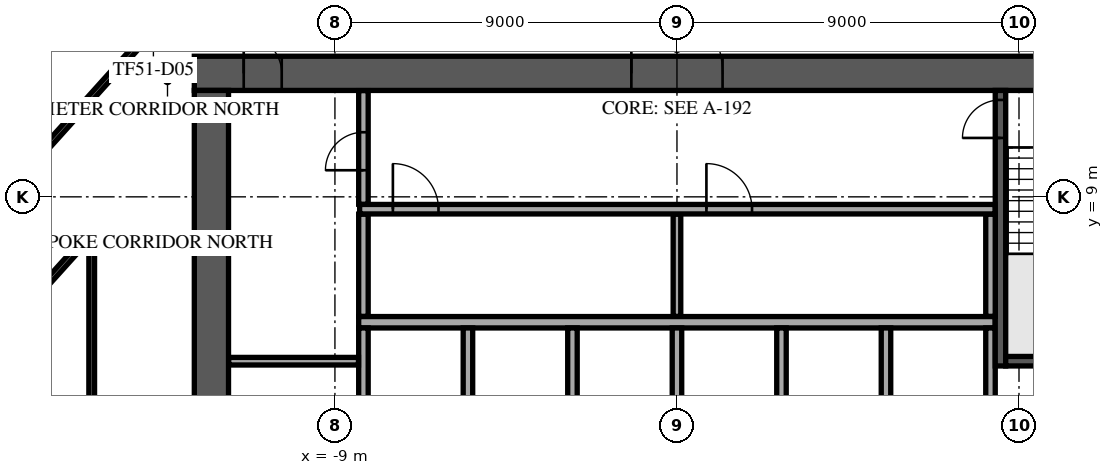
"""IFC4 building model, lengths in metres.
Left out: names, types, materials, properties, quantities, classifications, styles, units other than length and angle.
Written with IfcOpenShell. Run it as: python <this file> out.ifc"""

import sys

from ifc_helpers import new_model, si_unit, direction, frame, frame_2d, origin, place, context, subcontext, project, spatial, rectangle, extrude, element, fill, save


model = new_model("IFC4")
c1 = context("Model", 3, precision=1e-05, world=origin(), true_north=direction((0.0, 1.0)))
c2 = subcontext(c1, "Body", "Model", "MODEL_VIEW")
j1 = project(units=[si_unit("LENGTHUNIT", "METRE"), si_unit("PLANEANGLEUNIT", "RADIAN")], contexts=[c1])
p1 = place(None, origin())
s1 = spatial("IfcSite", under=j1, at=p1, CompositionType="ELEMENT")
p2 = place(p1, origin())
s2 = spatial("IfcBuilding", under=s1, at=p2, CompositionType="ELEMENT")
p3 = place(p2, frame((0.0, 0.0, 217.3)))
s3 = spatial("IfcBuildingStorey", under=s2, at=p3, CompositionType="ELEMENT", Elevation=217.3)
p4 = place(p3, frame((-12.7, 12.25, 0.0), z_axis=(0.0, 0.0, 1.0), x_axis=(1.0, 0.0, 0.0)))
e1 = element("IfcWall", 1, at=p4, inside=s3, PredefinedType="SHEAR", context=c2, shape_type="SweptSolid", body=[
    extrude(rectangle(XDim=25.4, YDim=0.9, at=frame_2d((12.7, 0.0))), origin(), (0.0, 0.0, 1.0), 3.62),
])
p5 = place(p4, frame((11.5, 0.0, 0.0)))
e2 = element("IfcOpeningElement", 2, at=p5, cuts=e1, PredefinedType="OPENING", context=c2, shape_type="SweptSolid", body=[
    extrude(rectangle(XDim=2.4, YDim=2.4, at=frame_2d((1.2, 1.2))), frame((0.0, 0.46, 0.0), z_axis=(0.0, -1.0, 0.0), x_axis=(1.0, 0.0, 0.0)), (0.0, 0.0, 1.0), 0.92),
])
p6 = place(p4, frame((22.325, 0.0, 0.0)))
e3 = element("IfcOpeningElement", 3, at=p6, cuts=e1, PredefinedType="OPENING", context=c2, shape_type="SweptSolid", body=[
    extrude(rectangle(XDim=1.2, YDim=2.1, at=frame_2d((0.6, 1.05))), frame((0.0, 0.46, 0.0), z_axis=(0.0, -1.0, 0.0), x_axis=(1.0, 0.0, 0.0)), (0.0, 0.0, 1.0), 0.92),
])
p7 = place(p4, frame((1.3, 0.0, 0.0)))
e4 = element("IfcOpeningElement", 4, at=p7, cuts=e1, PredefinedType="OPENING", context=c2, shape_type="SweptSolid", body=[
    extrude(rectangle(XDim=1.0, YDim=2.1, at=frame_2d((0.5, 1.05))), frame((0.0, 0.46, 0.0), z_axis=(0.0, -1.0, 0.0), x_axis=(1.0, 0.0, 0.0)), (0.0, 0.0, 1.0), 0.92),
])
p8 = place(p3, frame((-12.25, -11.8, 0.0), z_axis=(0.0, 0.0, 1.0), x_axis=(0.0, 1.0, 0.0)))
e5 = element("IfcWall", 5, at=p8, inside=s3, PredefinedType="SHEAR", context=c2, shape_type="SweptSolid", body=[
    extrude(rectangle(XDim=23.6, YDim=0.9, at=frame_2d((11.8, 0.0))), origin(), (0.0, 0.0, 1.0), 3.62),
])
p9 = place(p8, frame((10.6, 0.0, 0.0)))
e6 = element("IfcOpeningElement", 6, at=p9, cuts=e5, PredefinedType="OPENING", context=c2, shape_type="SweptSolid", body=[
    extrude(rectangle(XDim=2.4, YDim=2.4, at=frame_2d((1.2, 1.2))), frame((0.0, 0.46, 0.0), z_axis=(0.0, -1.0, 0.0), x_axis=(1.0, 0.0, 0.0)), (0.0, 0.0, 1.0), 0.92),
])
p10 = place(p3, frame((-8.375, 5.7, 0.0), z_axis=(0.0, 0.0, 1.0), x_axis=(1.0, 0.0, 0.0)))
e7 = element("IfcWall", 7, at=p10, inside=s3, PredefinedType="SOLIDWALL", context=c2, shape_type="SweptSolid", body=[
    extrude(rectangle(XDim=16.75, YDim=0.3, at=frame_2d((8.375, 0.0))), origin(), (0.0, 0.0, 1.0), 3.62),
])
for number, where, z_axis, x_axis in (
    (8, (-8.25, 2.85, 0.0), (0.0, 0.0, 1.0), (0.0, 1.0, 0.0)),
    (9, (-5.5, 2.85, 0.0), (0.0, 0.0, 1.0), (0.0, 1.0, 0.0)),
    (10, (-2.75, 2.85, 0.0), (0.0, 0.0, 1.0), (0.0, 1.0, 0.0)),
    (11, (0.0, 2.85, 0.0), (0.0, 0.0, 1.0), (0.0, 1.0, 0.0)),
    (12, (2.75, 2.85, 0.0), (0.0, 0.0, 1.0), (0.0, 1.0, 0.0)),
    (13, (5.5, 2.85, 0.0), (0.0, 0.0, 1.0), (0.0, 1.0, 0.0)),
    (14, (8.25, 2.85, 0.0), (0.0, 0.0, 1.0), (0.0, 1.0, 0.0)),
):
    element("IfcWall", number, at=place(p3, frame(where, z_axis=z_axis, x_axis=x_axis)), inside=s3, PredefinedType="SOLIDWALL", context=c2, shape_type="SweptSolid", body=[
        extrude(rectangle(XDim=2.7, YDim=0.25, at=frame_2d((1.35, 0.0))), origin(), (0.0, 0.0, 1.0), 3.62),
    ])
p11 = place(p3, frame((8.512, 4.55, 0.0), z_axis=(0.0, 0.0, 1.0), x_axis=(0.0, 1.0, 0.0)))
e15 = element("IfcWall", 15, at=p11, inside=s3, PredefinedType="SOLIDWALL", context=c2, shape_type="SweptSolid", body=[
    extrude(rectangle(XDim=7.25, YDim=0.275, at=frame_2d((3.625, 0.0))), origin(), (0.0, 0.0, 1.0), 3.62),
])
p12 = place(p11, frame((6.0, 0.0, 0.0)))
e16 = element("IfcOpeningElement", 16, at=p12, cuts=e15, PredefinedType="OPENING", context=c2, shape_type="SweptSolid", body=[
    extrude(rectangle(XDim=1.0, YDim=2.1, at=frame_2d((0.5, 1.05))), frame((0.0, 0.147, 0.0), z_axis=(0.0, -1.0, 0.0), x_axis=(1.0, 0.0, 0.0)), (0.0, 0.0, 1.0), 0.295),
])
p13 = place(p3, frame((8.65, 4.675, 0.0), z_axis=(0.0, 0.0, 1.0), x_axis=(1.0, 0.0, 0.0)))
e17 = element("IfcWall", 17, at=p13, inside=s3, PredefinedType="SOLIDWALL", context=c2, shape_type="SweptSolid", body=[
    extrude(rectangle(XDim=3.15, YDim=0.25, at=frame_2d((1.575, 0.0))), origin(), (0.0, 0.0, 1.0), 3.62),
])
p14 = place(p3, frame((-11.795, 4.675, 0.0), z_axis=(0.0, 0.0, 1.0), x_axis=(1.0, 0.0, 0.0)))
e18 = element("IfcWall", 18, at=p14, inside=s3, PredefinedType="PARTITIONING", context=c2, shape_type="SweptSolid", body=[
    extrude(rectangle(XDim=3.415, YDim=0.2, at=frame_2d((1.708, 0.0))), origin(), (0.0, 0.0, 1.0), 3.62),
])
p15 = place(p3, frame((-8.25, 5.855, 0.0), z_axis=(0.0, 0.0, 1.0), x_axis=(0.0, 1.0, 0.0)))
e19 = element("IfcWall", 19, at=p15, inside=s3, PredefinedType="PARTITIONING", context=c2, shape_type="SweptSolid", body=[
    extrude(rectangle(XDim=2.69, YDim=0.25, at=frame_2d((1.345, 0.0))), origin(), (0.0, 0.0, 1.0), 3.62),
])
p16 = place(p3, frame((0.0, 5.855, 0.0), z_axis=(0.0, 0.0, 1.0), x_axis=(0.0, 1.0, 0.0)))
e20 = element("IfcWall", 20, at=p16, inside=s3, PredefinedType="PARTITIONING", context=c2, shape_type="SweptSolid", body=[
    extrude(rectangle(XDim=2.69, YDim=0.2, at=frame_2d((1.345, 0.0))), origin(), (0.0, 0.0, 1.0), 3.62),
])
p17 = place(p3, frame((8.25, 5.855, 0.0), z_axis=(0.0, 0.0, 1.0), x_axis=(0.0, 1.0, 0.0)))
e21 = element("IfcWall", 21, at=p17, inside=s3, PredefinedType="PARTITIONING", context=c2, shape_type="SweptSolid", body=[
    extrude(rectangle(XDim=2.69, YDim=0.25, at=frame_2d((1.345, 0.0))), origin(), (0.0, 0.0, 1.0), 3.62),
])
p18 = place(p3, frame((-8.35, 8.675, 0.0), z_axis=(0.0, 0.0, 1.0), x_axis=(1.0, 0.0, 0.0)))
e22 = element("IfcWall", 22, at=p18, inside=s3, PredefinedType="PARTITIONING", context=c2, shape_type="SweptSolid", body=[
    extrude(rectangle(XDim=16.72, YDim=0.25, at=frame_2d((8.36, 0.0))), origin(), (0.0, 0.0, 1.0), 3.62),
])
p19 = place(p18, frame((0.875, 0.0, 0.0)))
e23 = element("IfcOpeningElement", 23, at=p19, cuts=e22, PredefinedType="OPENING", context=c2, shape_type="SweptSolid", body=[
    extrude(rectangle(XDim=1.2, YDim=2.1, at=frame_2d((0.6, 1.05))), frame((0.0, 0.135, 0.0), z_axis=(0.0, -1.0, 0.0), x_axis=(1.0, 0.0, 0.0)), (0.0, 0.0, 1.0), 0.27),
])
p20 = place(p18, frame((9.125, 0.0, 0.0)))
e24 = element("IfcOpeningElement", 24, at=p20, cuts=e22, PredefinedType="OPENING", context=c2, shape_type="SweptSolid", body=[
    extrude(rectangle(XDim=1.2, YDim=2.1, at=frame_2d((0.6, 1.05))), frame((0.0, 0.135, 0.0), z_axis=(0.0, -1.0, 0.0), x_axis=(1.0, 0.0, 0.0)), (0.0, 0.0, 1.0), 0.27),
])
p21 = place(p3, frame((-8.25, 8.805, 0.0), z_axis=(0.0, 0.0, 1.0), x_axis=(0.0, 1.0, 0.0)))
e25 = element("IfcWall", 25, at=p21, inside=s3, PredefinedType="PARTITIONING", context=c2, shape_type="SweptSolid", body=[
    extrude(rectangle(XDim=2.99, YDim=0.25, at=frame_2d((1.495, 0.0))), origin(), (0.0, 0.0, 1.0), 3.62),
])
p22 = place(p21, frame((0.895, 0.0, 0.0)))
e26 = element("IfcOpeningElement", 26, at=p22, cuts=e25, PredefinedType="OPENING", context=c2, shape_type="SweptSolid", body=[
    extrude(rectangle(XDim=1.0, YDim=2.1, at=frame_2d((0.5, 1.05))), frame((0.0, 0.135, 0.0), z_axis=(0.0, -1.0, 0.0), x_axis=(1.0, 0.0, 0.0)), (0.0, 0.0, 1.0), 0.27),
])
p23 = place(p3, frame((-1.962, 34.735, 0.0), z_axis=(0.0, 0.0, 1.0), x_axis=(-0.669133181838, -0.743142506497, 0.0)))
e27 = element("IfcWall", 27, at=p23, inside=s3, PredefinedType="STANDARD", context=c2, shape_type="SweptSolid", body=[
    extrude(rectangle(XDim=49.0, YDim=0.6, at=frame_2d((24.5, 0.0))), origin(), (0.0, 0.0, 1.0), 3.62),
])
p24 = place(p23, frame((1.227, 0.0, 0.9)))
e28 = element("IfcOpeningElement", 28, at=p24, cuts=e27, PredefinedType="OPENING", context=c2, shape_type="SweptSolid", body=[
    extrude(rectangle(XDim=2.0, YDim=2.1, at=frame_2d((1.0, 1.05))), frame((0.0, 0.31, 0.0), z_axis=(0.0, -1.0, 0.0), x_axis=(1.0, 0.0, 0.0)), (0.0, 0.0, 1.0), 0.62),
])
p25 = place(p23, frame((5.682, 0.0, 0.9)))
e29 = element("IfcOpeningElement", 29, at=p25, cuts=e27, PredefinedType="OPENING", context=c2, shape_type="SweptSolid", body=[
    extrude(rectangle(XDim=2.0, YDim=2.1, at=frame_2d((1.0, 1.05))), frame((0.0, 0.31, 0.0), z_axis=(0.0, -1.0, 0.0), x_axis=(1.0, 0.0, 0.0)), (0.0, 0.0, 1.0), 0.62),
])
p26 = place(p23, frame((10.136, 0.0, 0.9)))
e30 = element("IfcOpeningElement", 30, at=p26, cuts=e27, PredefinedType="OPENING", context=c2, shape_type="SweptSolid", body=[
    extrude(rectangle(XDim=2.0, YDim=2.1, at=frame_2d((1.0, 1.05))), frame((0.0, 0.31, 0.0), z_axis=(0.0, -1.0, 0.0), x_axis=(1.0, 0.0, 0.0)), (0.0, 0.0, 1.0), 0.62),
])
p27 = place(p23, frame((14.591, 0.0, 0.9)))
e31 = element("IfcOpeningElement", 31, at=p27, cuts=e27, PredefinedType="OPENING", context=c2, shape_type="SweptSolid", body=[
    extrude(rectangle(XDim=2.0, YDim=2.1, at=frame_2d((1.0, 1.05))), frame((0.0, 0.31, 0.0), z_axis=(0.0, -1.0, 0.0), x_axis=(1.0, 0.0, 0.0)), (0.0, 0.0, 1.0), 0.62),
])
p28 = place(p23, frame((19.045, 0.0, 0.9)))
e32 = element("IfcOpeningElement", 32, at=p28, cuts=e27, PredefinedType="OPENING", context=c2, shape_type="SweptSolid", body=[
    extrude(rectangle(XDim=2.0, YDim=2.1, at=frame_2d((1.0, 1.05))), frame((0.0, 0.31, 0.0), z_axis=(0.0, -1.0, 0.0), x_axis=(1.0, 0.0, 0.0)), (0.0, 0.0, 1.0), 0.62),
])
p29 = place(p23, frame((23.5, 0.0, 0.9)))
e33 = element("IfcOpeningElement", 33, at=p29, cuts=e27, PredefinedType="OPENING", context=c2, shape_type="SweptSolid", body=[
    extrude(rectangle(XDim=2.0, YDim=2.1, at=frame_2d((1.0, 1.05))), frame((0.0, 0.31, 0.0), z_axis=(0.0, -1.0, 0.0), x_axis=(1.0, 0.0, 0.0)), (0.0, 0.0, 1.0), 0.62),
])
p30 = place(p23, frame((27.955, 0.0, 0.9)))
e34 = element("IfcOpeningElement", 34, at=p30, cuts=e27, PredefinedType="OPENING", context=c2, shape_type="SweptSolid", body=[
    extrude(rectangle(XDim=2.0, YDim=2.1, at=frame_2d((1.0, 1.05))), frame((0.0, 0.31, 0.0), z_axis=(0.0, -1.0, 0.0), x_axis=(1.0, 0.0, 0.0)), (0.0, 0.0, 1.0), 0.62),
])
p31 = place(p23, frame((32.409, 0.0, 0.9)))
e35 = element("IfcOpeningElement", 35, at=p31, cuts=e27, PredefinedType="OPENING", context=c2, shape_type="SweptSolid", body=[
    extrude(rectangle(XDim=2.0, YDim=2.1, at=frame_2d((1.0, 1.05))), frame((0.0, 0.31, 0.0), z_axis=(0.0, -1.0, 0.0), x_axis=(1.0, 0.0, 0.0)), (0.0, 0.0, 1.0), 0.62),
])
p32 = place(p23, frame((36.864, 0.0, 0.9)))
e36 = element("IfcOpeningElement", 36, at=p32, cuts=e27, PredefinedType="OPENING", context=c2, shape_type="SweptSolid", body=[
    extrude(rectangle(XDim=2.0, YDim=2.1, at=frame_2d((1.0, 1.05))), frame((0.0, 0.31, 0.0), z_axis=(0.0, -1.0, 0.0), x_axis=(1.0, 0.0, 0.0)), (0.0, 0.0, 1.0), 0.62),
])
p33 = place(p23, frame((41.318, 0.0, 0.9)))
e37 = element("IfcOpeningElement", 37, at=p33, cuts=e27, PredefinedType="OPENING", context=c2, shape_type="SweptSolid", body=[
    extrude(rectangle(XDim=2.0, YDim=2.1, at=frame_2d((1.0, 1.05))), frame((0.0, 0.31, 0.0), z_axis=(0.0, -1.0, 0.0), x_axis=(1.0, 0.0, 0.0)), (0.0, 0.0, 1.0), 0.62),
])
p34 = place(p23, frame((45.773, 0.0, 0.9)))
e38 = element("IfcOpeningElement", 38, at=p34, cuts=e27, PredefinedType="OPENING", context=c2, shape_type="SweptSolid", body=[
    extrude(rectangle(XDim=2.0, YDim=2.1, at=frame_2d((1.0, 1.05))), frame((0.0, 0.31, 0.0), z_axis=(0.0, -1.0, 0.0), x_axis=(1.0, 0.0, 0.0)), (0.0, 0.0, 1.0), 0.62),
])
p35 = place(p3, frame((34.365, 9.023, 0.0), z_axis=(0.0, 0.0, 1.0), x_axis=(-0.743146896498, 0.66912830625, 0.0)))
e39 = element("IfcWall", 39, at=p35, inside=s3, PredefinedType="STANDARD", context=c2, shape_type="SweptSolid", body=[
    extrude(rectangle(XDim=39.0, YDim=0.6, at=frame_2d((19.5, 0.0))), origin(), (0.0, 0.0, 1.0), 3.62),
])
p36 = place(p35, frame((1.217, 0.0, 0.9)))
e40 = element("IfcOpeningElement", 40, at=p36, cuts=e39, PredefinedType="OPENING", context=c2, shape_type="SweptSolid", body=[
    extrude(rectangle(XDim=1.9, YDim=2.1, at=frame_2d((0.95, 1.05))), frame((0.0, 0.31, 0.0), z_axis=(0.0, -1.0, 0.0), x_axis=(1.0, 0.0, 0.0)), (0.0, 0.0, 1.0), 0.62),
])
p37 = place(p35, frame((5.55, 0.0, 0.9)))
e41 = element("IfcOpeningElement", 41, at=p37, cuts=e39, PredefinedType="OPENING", context=c2, shape_type="SweptSolid", body=[
    extrude(rectangle(XDim=1.9, YDim=2.1, at=frame_2d((0.95, 1.05))), frame((0.0, 0.31, 0.0), z_axis=(0.0, -1.0, 0.0), x_axis=(1.0, 0.0, 0.0)), (0.0, 0.0, 1.0), 0.62),
])
p38 = place(p35, frame((9.883, 0.0, 0.9)))
e42 = element("IfcOpeningElement", 42, at=p38, cuts=e39, PredefinedType="OPENING", context=c2, shape_type="SweptSolid", body=[
    extrude(rectangle(XDim=1.9, YDim=2.1, at=frame_2d((0.95, 1.05))), frame((0.0, 0.31, 0.0), z_axis=(0.0, -1.0, 0.0), x_axis=(1.0, 0.0, 0.0)), (0.0, 0.0, 1.0), 0.62),
])
p39 = place(p35, frame((14.217, 0.0, 0.9)))
e43 = element("IfcOpeningElement", 43, at=p39, cuts=e39, PredefinedType="OPENING", context=c2, shape_type="SweptSolid", body=[
    extrude(rectangle(XDim=1.9, YDim=2.1, at=frame_2d((0.95, 1.05))), frame((0.0, 0.31, 0.0), z_axis=(0.0, -1.0, 0.0), x_axis=(1.0, 0.0, 0.0)), (0.0, 0.0, 1.0), 0.62),
])
p40 = place(p35, frame((18.55, 0.0, 0.9)))
e44 = element("IfcOpeningElement", 44, at=p40, cuts=e39, PredefinedType="OPENING", context=c2, shape_type="SweptSolid", body=[
    extrude(rectangle(XDim=1.9, YDim=2.1, at=frame_2d((0.95, 1.05))), frame((0.0, 0.31, 0.0), z_axis=(0.0, -1.0, 0.0), x_axis=(1.0, 0.0, 0.0)), (0.0, 0.0, 1.0), 0.62),
])
p41 = place(p35, frame((22.883, 0.0, 0.9)))
e45 = element("IfcOpeningElement", 45, at=p41, cuts=e39, PredefinedType="OPENING", context=c2, shape_type="SweptSolid", body=[
    extrude(rectangle(XDim=1.9, YDim=2.1, at=frame_2d((0.95, 1.05))), frame((0.0, 0.31, 0.0), z_axis=(0.0, -1.0, 0.0), x_axis=(1.0, 0.0, 0.0)), (0.0, 0.0, 1.0), 0.62),
])
p42 = place(p35, frame((27.217, 0.0, 0.9)))
e46 = element("IfcOpeningElement", 46, at=p42, cuts=e39, PredefinedType="OPENING", context=c2, shape_type="SweptSolid", body=[
    extrude(rectangle(XDim=1.9, YDim=2.1, at=frame_2d((0.95, 1.05))), frame((0.0, 0.31, 0.0), z_axis=(0.0, -1.0, 0.0), x_axis=(1.0, 0.0, 0.0)), (0.0, 0.0, 1.0), 0.62),
])
p43 = place(p35, frame((31.55, 0.0, 0.9)))
e47 = element("IfcOpeningElement", 47, at=p43, cuts=e39, PredefinedType="OPENING", context=c2, shape_type="SweptSolid", body=[
    extrude(rectangle(XDim=1.9, YDim=2.1, at=frame_2d((0.95, 1.05))), frame((0.0, 0.31, 0.0), z_axis=(0.0, -1.0, 0.0), x_axis=(1.0, 0.0, 0.0)), (0.0, 0.0, 1.0), 0.62),
])
p44 = place(p35, frame((35.883, 0.0, 0.9)))
e48 = element("IfcOpeningElement", 48, at=p44, cuts=e39, PredefinedType="OPENING", context=c2, shape_type="SweptSolid", body=[
    extrude(rectangle(XDim=1.9, YDim=2.1, at=frame_2d((0.95, 1.05))), frame((0.0, 0.31, 0.0), z_axis=(0.0, -1.0, 0.0), x_axis=(1.0, 0.0, 0.0)), (0.0, 0.0, 1.0), 0.62),
])
p45 = place(p3, frame((-24.952, 1.024, 0.0), z_axis=(0.0, 0.0, 1.0), x_axis=(0.66912723064, 0.743147864974, 0.0)))
e49 = element("IfcWall", 49, at=p45, inside=s3, PredefinedType="PARTITIONING", context=c2, shape_type="SweptSolid", body=[
    extrude(rectangle(XDim=31.871, YDim=0.15, at=frame_2d((15.936, 0.0))), origin(), (0.0, 0.0, 1.0), 3.17),
])
p46 = place(p45, frame((16.202, 0.0, 0.0)))
e50 = element("IfcOpeningElement", 50, at=p46, cuts=e49, PredefinedType="OPENING", context=c2, shape_type="SweptSolid", body=[
    extrude(rectangle(XDim=1.0, YDim=2.1, at=frame_2d((0.5, 1.05))), frame((0.0, 0.085, 0.0), z_axis=(0.0, -1.0, 0.0), x_axis=(1.0, 0.0, 0.0)), (0.0, 0.0, 1.0), 0.17),
])
p47 = place(p45, frame((28.08, 0.0, 0.0)))
e51 = element("IfcOpeningElement", 51, at=p47, cuts=e49, PredefinedType="OPENING", context=c2, shape_type="SweptSolid", body=[
    extrude(rectangle(XDim=1.8, YDim=2.1, at=frame_2d((0.9, 1.05))), frame((0.0, 0.085, 0.0), z_axis=(0.0, -1.0, 0.0), x_axis=(1.0, 0.0, 0.0)), (0.0, 0.0, 1.0), 0.17),
])
p48 = place(p45, frame((22.58, 0.0, 0.0)))
e52 = element("IfcOpeningElement", 52, at=p48, cuts=e49, PredefinedType="OPENING", context=c2, shape_type="SweptSolid", body=[
    extrude(rectangle(XDim=1.0, YDim=2.1, at=frame_2d((0.5, 1.05))), frame((0.0, 0.085, 0.0), z_axis=(0.0, -1.0, 0.0), x_axis=(1.0, 0.0, 0.0)), (0.0, 0.0, 1.0), 0.17),
])
p49 = place(p3, frame((-23.119, -0.526, 0.0), z_axis=(0.0, 0.0, 1.0), x_axis=(0.669146693107, 0.743130340589, 0.0)))
e53 = element("IfcWall", 53, at=p49, inside=s3, PredefinedType="PARTITIONING", context=c2, shape_type="SweptSolid", body=[
    extrude(rectangle(XDim=11.415, YDim=0.15, at=frame_2d((5.707, 0.0))), origin(), (0.0, 0.0, 1.0), 3.17),
])
p50 = place(p49, frame((7.178, 0.0, 0.0)))
e54 = element("IfcOpeningElement", 54, at=p50, cuts=e53, PredefinedType="OPENING", context=c2, shape_type="SweptSolid", body=[
    extrude(rectangle(XDim=1.0, YDim=2.1, at=frame_2d((0.5, 1.05))), frame((0.0, 0.085, 0.0), z_axis=(0.0, -1.0, 0.0), x_axis=(1.0, 0.0, 0.0)), (0.0, 0.0, 1.0), 0.17),
])
p51 = place(p3, frame((-15.4, -12.311, 0.0), z_axis=(0.0, 0.0, 1.0), x_axis=(0.0, 1.0, 0.0)))
e55 = element("IfcWall", 55, at=p51, inside=s3, PredefinedType="PARTITIONING", context=c2, shape_type="SweptSolid", body=[
    extrude(rectangle(XDim=20.194, YDim=0.15, at=frame_2d((10.097, 0.0))), origin(), (0.0, 0.0, 1.0), 3.17),
])
p52 = place(p51, frame((1.3, 0.0, 0.0)))
e56 = element("IfcOpeningElement", 56, at=p52, cuts=e55, PredefinedType="OPENING", context=c2, shape_type="SweptSolid", body=[
    extrude(rectangle(XDim=1.8, YDim=2.1, at=frame_2d((0.9, 1.05))), frame((0.0, 0.085, 0.0), z_axis=(0.0, -1.0, 0.0), x_axis=(1.0, 0.0, 0.0)), (0.0, 0.0, 1.0), 0.17),
])
p53 = place(p3, frame((5.128, 24.958, 0.0), z_axis=(0.0, 0.0, 1.0), x_axis=(0.743144813636, -0.66913061951, 0.0)))
e57 = element("IfcWall", 57, at=p53, inside=s3, PredefinedType="PARTITIONING", context=c2, shape_type="SweptSolid", body=[
    extrude(rectangle(XDim=25.854, YDim=0.15, at=frame_2d((12.927, 0.0))), origin(), (0.0, 0.0, 1.0), 3.17),
])
p54 = place(p53, frame((8.946, 0.0, 0.0)))
e58 = element("IfcOpeningElement", 58, at=p54, cuts=e57, PredefinedType="OPENING", context=c2, shape_type="SweptSolid", body=[
    extrude(rectangle(XDim=1.0, YDim=2.1, at=frame_2d((0.5, 1.05))), frame((0.0, 0.085, 0.0), z_axis=(0.0, -1.0, 0.0), x_axis=(1.0, 0.0, 0.0)), (0.0, 0.0, 1.0), 0.17),
])
p55 = place(p53, frame((20.29, 0.0, 0.0)))
e59 = element("IfcOpeningElement", 59, at=p55, cuts=e57, PredefinedType="OPENING", context=c2, shape_type="SweptSolid", body=[
    extrude(rectangle(XDim=1.8, YDim=2.1, at=frame_2d((0.9, 1.05))), frame((0.0, 0.085, 0.0), z_axis=(0.0, -1.0, 0.0), x_axis=(1.0, 0.0, 0.0)), (0.0, 0.0, 1.0), 0.17),
])
p56 = place(p3, frame((-19.129, 3.792, 0.0), z_axis=(0.0, 0.0, 1.0), x_axis=(0.74316706076, -0.66910591075, 0.0)))
e60 = element("IfcWall", 60, at=p56, inside=s3, PredefinedType="PARTITIONING", context=c2, shape_type="SweptSolid", body=[
    extrude(rectangle(XDim=4.872, YDim=0.1, at=frame_2d((2.436, 0.0))), origin(), (0.0, 0.0, 1.0), 3.17),
])
p57 = place(p5, origin())
e61 = element("IfcDoor", 61, at=p57, inside=s3, OperationType="SINGLE_SWING_LEFT", PredefinedType="DOOR", context=c2, shape_type="SweptSolid", body=[
    extrude(rectangle(XDim=2.4, YDim=2.4, at=frame_2d((1.2, 1.2))), frame((0.0, 0.025, 0.0), z_axis=(0.0, -1.0, 0.0), x_axis=(1.0, 0.0, 0.0)), (0.0, 0.0, 1.0), 0.05),
])
fill(e2, e61)
p58 = place(p7, origin())
e62 = element("IfcDoor", 62, at=p58, inside=s3, OperationType="SINGLE_SWING_LEFT", PredefinedType="DOOR", context=c2, shape_type="SweptSolid", body=[
    extrude(rectangle(XDim=1.0, YDim=2.1, at=frame_2d((0.5, 1.05))), frame((0.0, 0.025, 0.0), z_axis=(0.0, -1.0, 0.0), x_axis=(1.0, 0.0, 0.0)), (0.0, 0.0, 1.0), 0.05),
])
fill(e4, e62)
p59 = place(p12, origin())
e63 = element("IfcDoor", 63, at=p59, inside=s3, OperationType="SINGLE_SWING_LEFT", PredefinedType="DOOR", context=c2, shape_type="SweptSolid", body=[
    extrude(rectangle(XDim=1.0, YDim=2.1, at=frame_2d((0.5, 1.05))), frame((0.0, 0.025, 0.0), z_axis=(0.0, -1.0, 0.0), x_axis=(1.0, 0.0, 0.0)), (0.0, 0.0, 1.0), 0.05),
])
fill(e16, e63)
p60 = place(p22, origin())
e64 = element("IfcDoor", 64, at=p60, inside=s3, OperationType="SINGLE_SWING_RIGHT", PredefinedType="DOOR", context=c2, shape_type="SweptSolid", body=[
    extrude(rectangle(XDim=1.0, YDim=2.1, at=frame_2d((0.5, 1.05))), frame((0.0, 0.025, 0.0), z_axis=(0.0, -1.0, 0.0), x_axis=(1.0, 0.0, 0.0)), (0.0, 0.0, 1.0), 0.05),
])
fill(e26, e64)
p61 = place(p19, origin())
e65 = element("IfcDoor", 65, at=p61, inside=s3, OperationType="SINGLE_SWING_LEFT", PredefinedType="DOOR", context=c2, shape_type="SweptSolid", body=[
    extrude(rectangle(XDim=1.2, YDim=2.1, at=frame_2d((0.6, 1.05))), frame((0.0, 0.025, 0.0), z_axis=(0.0, -1.0, 0.0), x_axis=(1.0, 0.0, 0.0)), (0.0, 0.0, 1.0), 0.05),
])
fill(e23, e65)
p62 = place(p20, origin())
e66 = element("IfcDoor", 66, at=p62, inside=s3, OperationType="SINGLE_SWING_LEFT", PredefinedType="DOOR", context=c2, shape_type="SweptSolid", body=[
    extrude(rectangle(XDim=1.2, YDim=2.1, at=frame_2d((0.6, 1.05))), frame((0.0, 0.025, 0.0), z_axis=(0.0, -1.0, 0.0), x_axis=(1.0, 0.0, 0.0)), (0.0, 0.0, 1.0), 0.05),
])
fill(e24, e66)
save(model, sys.argv[1])
